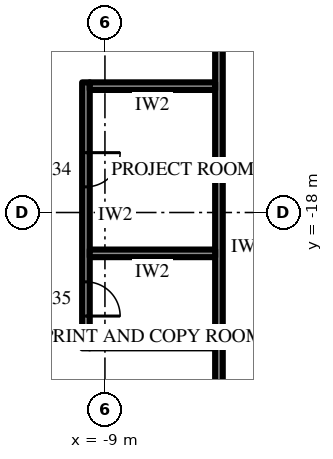
"""IFC4 building model, lengths in metres.
Left out: names, types, materials, properties, quantities, classifications, styles, units other than length and angle.
Written with IfcOpenShell. Run it as: python <this file> out.ifc"""

import sys

from ifc_helpers import new_model, si_unit, direction, frame, frame_2d, origin, place, context, subcontext, project, spatial, rectangle, extrude, element, fill, save


model = new_model("IFC4")
c1 = context("Model", 3, precision=1e-05, world=origin(), true_north=direction((0.0, 1.0)))
c2 = subcontext(c1, "Body", "Model", "MODEL_VIEW")
j1 = project(units=[si_unit("LENGTHUNIT", "METRE"), si_unit("PLANEANGLEUNIT", "RADIAN")], contexts=[c1])
p1 = place(None, origin())
s1 = spatial("IfcSite", under=j1, at=p1, CompositionType="ELEMENT")
p2 = place(p1, origin())
s2 = spatial("IfcBuilding", under=s1, at=p2, CompositionType="ELEMENT")
p3 = place(p2, frame((0.0, 0.0, 295.3)))
s3 = spatial("IfcBuildingStorey", under=s2, at=p3, CompositionType="ELEMENT", Elevation=295.3)
p4 = place(p3, frame((-6.0, -12.3, 0.0), z_axis=(0.0, 0.0, 1.0), x_axis=(0.0, -1.0, 0.0)))
e1 = element("IfcWall", 1, at=p4, inside=s3, PredefinedType="PARTITIONING", context=c2, shape_type="SweptSolid", body=[
    extrude(rectangle(XDim=16.5, YDim=0.2, at=frame_2d((8.25, 0.0))), origin(), (0.0, 0.0, 1.0), 3.9),
])
p5 = place(p3, frame((-9.5, -14.575, 0.0), z_axis=(0.0, 0.0, 1.0), x_axis=(0.0, -1.0, 0.0)))
e2 = element("IfcWall", 2, at=p5, inside=s3, PredefinedType="PARTITIONING", context=c2, shape_type="SweptSolid", body=[
    extrude(rectangle(XDim=7.0, YDim=0.2, at=frame_2d((3.5, 0.0))), origin(), (0.0, 0.0, 1.0), 3.9),
])
p6 = place(p5, frame((1.85, 0.0, 0.0)))
e3 = element("IfcOpeningElement", 3, at=p6, cuts=e2, PredefinedType="OPENING", context=c2, shape_type="SweptSolid", body=[
    extrude(rectangle(XDim=0.9, YDim=2.2, at=frame_2d((0.45, 1.1))), frame((0.0, 0.11, 0.0), z_axis=(0.0, -1.0, 0.0), x_axis=(1.0, 0.0, 0.0)), (0.0, 0.0, 1.0), 0.22),
])
p7 = place(p5, frame((5.25, 0.0, 0.0)))
e4 = element("IfcOpeningElement", 4, at=p7, cuts=e2, PredefinedType="OPENING", context=c2, shape_type="SweptSolid", body=[
    extrude(rectangle(XDim=0.9, YDim=2.2, at=frame_2d((0.45, 1.1))), frame((0.0, 0.11, 0.0), z_axis=(0.0, -1.0, 0.0), x_axis=(1.0, 0.0, 0.0)), (0.0, 0.0, 1.0), 0.22),
])
for number, where, z_axis, x_axis in (
    (5, (-6.1, -14.675, 0.0), (0.0, 0.0, 1.0), (-1.0, 0.0, 0.0)),
    (6, (-6.1, -19.075, 0.0), (0.0, 0.0, 1.0), (-1.0, 0.0, 0.0)),
    (7, (-6.1, -21.475, 0.0), (0.0, 0.0, 1.0), (-1.0, 0.0, 0.0)),
):
    element("IfcWall", number, at=place(p3, frame(where, z_axis=z_axis, x_axis=x_axis)), inside=s3, PredefinedType="PARTITIONING", context=c2, shape_type="SweptSolid", body=[
        extrude(rectangle(XDim=3.3, YDim=0.2, at=frame_2d((1.65, 0.0))), origin(), (0.0, 0.0, 1.0), 3.9),
    ])
p8 = place(p6, origin())
e8 = element("IfcDoor", 8, at=p8, inside=s3, OperationType="SINGLE_SWING_RIGHT", PredefinedType="DOOR", context=c2, shape_type="SweptSolid", body=[
    extrude(rectangle(XDim=0.9, YDim=2.2, at=frame_2d((0.45, 1.1))), frame((0.0, 0.025, 0.0), z_axis=(0.0, -1.0, 0.0), x_axis=(1.0, 0.0, 0.0)), (0.0, 0.0, 1.0), 0.05),
])
fill(e3, e8)
p9 = place(p7, origin())
e9 = element("IfcDoor", 9, at=p9, inside=s3, OperationType="SINGLE_SWING_LEFT", PredefinedType="DOOR", context=c2, shape_type="SweptSolid", body=[
    extrude(rectangle(XDim=0.9, YDim=2.2, at=frame_2d((0.45, 1.1))), frame((0.0, 0.025, 0.0), z_axis=(0.0, -1.0, 0.0), x_axis=(1.0, 0.0, 0.0)), (0.0, 0.0, 1.0), 0.05),
])
fill(e4, e9)
save(model, sys.argv[1])
